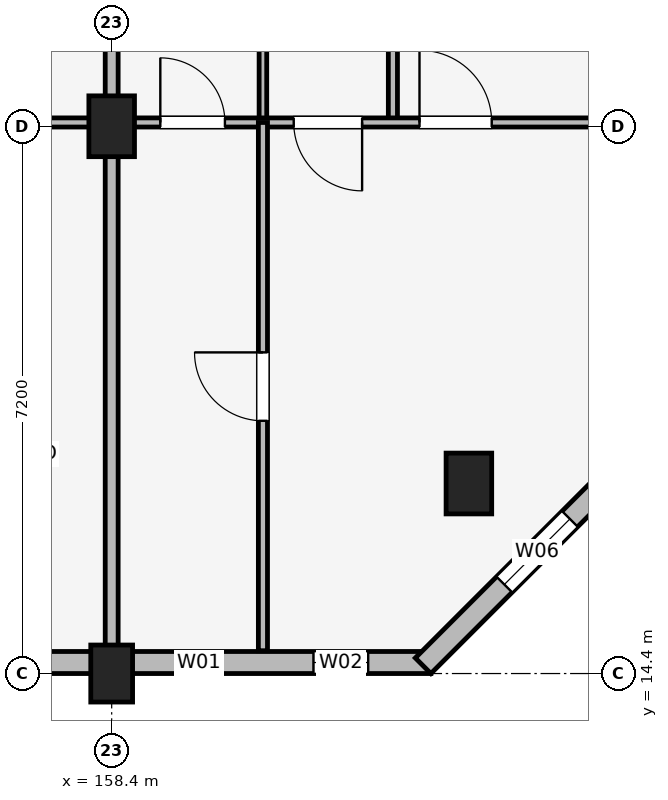
"""IFC4 building model, lengths in metres.
Left out: names, types, materials, properties, quantities, classifications, styles, units other than length and angle.
Written with IfcOpenShell. Run it as: python <this file> out.ifc"""

import sys

from ifc_helpers import new_model, si_unit, direction, frame, frame_2d, origin, origin_2d, place, context, subcontext, project, spatial, rectangle, extrude, element, fill, save


model = new_model("IFC4")
c1 = context("Model", 3, precision=1e-05, world=origin(), true_north=direction((0.0, 1.0)))
c2 = subcontext(c1, "Body", "Model", "MODEL_VIEW")
j1 = project(units=[si_unit("LENGTHUNIT", "METRE"), si_unit("PLANEANGLEUNIT", "RADIAN")], contexts=[c1])
p1 = place(None, origin())
s1 = spatial("IfcSite", under=j1, at=p1, CompositionType="ELEMENT")
p2 = place(p1, origin())
s2 = spatial("IfcBuilding", under=s1, at=p2, CompositionType="ELEMENT")
p3 = place(p2, origin())
s3 = spatial("IfcBuildingStorey", under=s2, at=p3, CompositionType="ELEMENT", Elevation=0.0)
p4 = place(p3, frame((158.4, 14.4, 0.0), z_axis=(0.0, 0.0, 1.0), x_axis=(1.0, 0.0, 0.0)))
e1 = element("IfcColumn", 1, at=p4, inside=s3, PredefinedType="COLUMN", context=c2, shape_type="SweptSolid", body=[
    extrude(rectangle(XDim=0.55, YDim=0.75, at=origin_2d()), origin(), (0.0, 0.0, 1.0), 4.5),
])
for number, where, z_axis, x_axis in (
    (2, (158.4, 21.6, 0.0), (0.0, 0.0, 1.0), (1.0, 0.0, 0.0)),
    (3, (163.1, 16.9, 0.0), (0.0, 0.0, 1.0), (1.0, 0.0, 0.0)),
):
    element("IfcColumn", number, at=place(p3, frame(where, z_axis=z_axis, x_axis=x_axis)), inside=s3, PredefinedType="COLUMN", context=c2, shape_type="SweptSolid", body=[
        extrude(rectangle(XDim=0.6, YDim=0.8, at=origin_2d()), origin(), (0.0, 0.0, 1.0), 4.5),
    ])
p5 = place(p3, frame((132.6, 14.545, 0.0), z_axis=(0.0, 0.0, 1.0), x_axis=(1.0, 0.0, 0.0)))
e4 = element("IfcWall", 4, at=p5, inside=s3, PredefinedType="SOLIDWALL", context=c2, shape_type="SweptSolid", body=[
    extrude(rectangle(XDim=30.0, YDim=0.29, at=frame_2d((15.0, 0.0))), origin(), (0.0, 0.0, 1.0), 3.38),
])
p6 = place(p5, frame((14.35, 0.0, 0.0), z_axis=(0.0, 0.0, 1.0), x_axis=(-1.0, 0.0, 0.0)))
e5 = element("IfcOpeningElement", 5, at=p6, cuts=e4, PredefinedType="OPENING", context=c2, shape_type="SweptSolid", body=[
    extrude(rectangle(XDim=1.8, YDim=2.4, at=frame_2d((0.9, 1.2))), frame((0.0, 0.155, 0.0), z_axis=(0.0, -1.0, 0.0), x_axis=(1.0, 0.0, 0.0)), (0.0, 0.0, 1.0), 0.31),
])
p7 = place(p5, frame((2.663, 0.0, 0.75)))
e6 = element("IfcOpeningElement", 6, at=p7, cuts=e4, PredefinedType="OPENING", context=c2, shape_type="SweptSolid", body=[
    extrude(rectangle(XDim=0.98, YDim=1.45, at=frame_2d((0.49, 0.725))), frame((0.0, 0.155, 0.0), z_axis=(0.0, -1.0, 0.0), x_axis=(1.0, 0.0, 0.0)), (0.0, 0.0, 1.0), 0.31),
])
p8 = place(p5, frame((4.798, 0.0, 0.75)))
e7 = element("IfcOpeningElement", 7, at=p8, cuts=e4, PredefinedType="OPENING", context=c2, shape_type="SweptSolid", body=[
    extrude(rectangle(XDim=1.1, YDim=1.5, at=frame_2d((0.55, 0.75))), frame((0.0, 0.155, 0.0), z_axis=(0.0, -1.0, 0.0), x_axis=(1.0, 0.0, 0.0)), (0.0, 0.0, 1.0), 0.31),
])
p9 = place(p5, frame((7.492, 0.0, 0.7)))
e8 = element("IfcOpeningElement", 8, at=p9, cuts=e4, PredefinedType="OPENING", context=c2, shape_type="SweptSolid", body=[
    extrude(rectangle(XDim=2.3, YDim=1.65, at=frame_2d((1.15, 0.825))), frame((0.0, 0.155, 0.0), z_axis=(0.0, -1.0, 0.0), x_axis=(1.0, 0.0, 0.0)), (0.0, 0.0, 1.0), 0.31),
])
p10 = place(p5, frame((19.077, 0.0, 0.75)))
e9 = element("IfcOpeningElement", 9, at=p10, cuts=e4, PredefinedType="OPENING", context=c2, shape_type="SweptSolid", body=[
    extrude(rectangle(XDim=1.34, YDim=1.55, at=frame_2d((0.67, 0.775))), frame((0.0, 0.155, 0.0), z_axis=(0.0, -1.0, 0.0), x_axis=(1.0, 0.0, 0.0)), (0.0, 0.0, 1.0), 0.31),
])
p11 = place(p5, frame((22.317, 0.0, 0.7)))
e10 = element("IfcOpeningElement", 10, at=p11, cuts=e4, PredefinedType="OPENING", context=c2, shape_type="SweptSolid", body=[
    extrude(rectangle(XDim=1.45, YDim=2.1, at=frame_2d((0.725, 1.05))), frame((0.0, 0.155, 0.0), z_axis=(0.0, -1.0, 0.0), x_axis=(1.0, 0.0, 0.0)), (0.0, 0.0, 1.0), 0.31),
])
p12 = place(p5, frame((26.647, 0.0, 0.75)))
e11 = element("IfcOpeningElement", 11, at=p12, cuts=e4, PredefinedType="OPENING", context=c2, shape_type="SweptSolid", body=[
    extrude(rectangle(XDim=0.6, YDim=1.25, at=frame_2d((0.3, 0.625))), frame((0.0, 0.155, 0.0), z_axis=(0.0, -1.0, 0.0), x_axis=(1.0, 0.0, 0.0)), (0.0, 0.0, 1.0), 0.31),
])
p13 = place(p5, frame((28.455, 0.0, 0.75)))
e12 = element("IfcOpeningElement", 12, at=p13, cuts=e4, PredefinedType="OPENING", context=c2, shape_type="SweptSolid", body=[
    extrude(rectangle(XDim=0.72, YDim=1.35, at=frame_2d((0.36, 0.675))), frame((0.0, 0.155, 0.0), z_axis=(0.0, -1.0, 0.0), x_axis=(1.0, 0.0, 0.0)), (0.0, 0.0, 1.0), 0.31),
])
p14 = place(p3, frame((162.498, 14.502, 0.0), z_axis=(0.0, 0.0, 1.0), x_axis=(0.707106781187, 0.707106781187, 0.0)))
e13 = element("IfcWall", 13, at=p14, inside=s3, PredefinedType="SOLIDWALL", context=c2, shape_type="SweptSolid", body=[
    extrude(rectangle(XDim=4.243, YDim=0.29, at=frame_2d((2.121, 0.0))), origin(), (0.0, 0.0, 1.0), 4.175),
])
p15 = place(p14, frame((1.511, 0.0, 0.85)))
e14 = element("IfcOpeningElement", 14, at=p15, cuts=e13, PredefinedType="OPENING", context=c2, shape_type="SweptSolid", body=[
    extrude(rectangle(XDim=1.22, YDim=1.5, at=frame_2d((0.61, 0.75))), frame((0.0, 0.155, 0.0), z_axis=(0.0, -1.0, 0.0), x_axis=(1.0, 0.0, 0.0)), (0.0, 0.0, 1.0), 0.31),
])
p16 = place(p3, frame((151.34, 21.65, 0.0), z_axis=(0.0, 0.0, 1.0), x_axis=(1.0, 0.0, 0.0)))
e15 = element("IfcWall", 15, at=p16, inside=s3, PredefinedType="PARTITIONING", context=c2, shape_type="SweptSolid", body=[
    extrude(rectangle(XDim=6.92, YDim=0.12, at=frame_2d((3.46, 0.0))), origin(), (0.0, 0.0, 1.0), 3.15),
])
p17 = place(p16, frame((1.35, 0.0, 0.0), z_axis=(0.0, 0.0, 1.0), x_axis=(-1.0, 0.0, 0.0)))
e16 = element("IfcOpeningElement", 16, at=p17, cuts=e15, PredefinedType="OPENING", context=c2, shape_type="SweptSolid", body=[
    extrude(rectangle(XDim=0.85, YDim=2.08, at=frame_2d((0.425, 1.04))), frame((0.0, 0.07, 0.0), z_axis=(0.0, -1.0, 0.0), x_axis=(1.0, 0.0, 0.0)), (0.0, 0.0, 1.0), 0.14),
])
p18 = place(p16, frame((2.375, 0.0, 0.0)))
e17 = element("IfcOpeningElement", 17, at=p18, cuts=e15, PredefinedType="OPENING", context=c2, shape_type="SweptSolid", body=[
    extrude(rectangle(XDim=0.9, YDim=2.08, at=frame_2d((0.45, 1.04))), frame((0.0, 0.07, 0.0), z_axis=(0.0, -1.0, 0.0), x_axis=(1.0, 0.0, 0.0)), (0.0, 0.0, 1.0), 0.14),
])
p19 = place(p16, frame((5.835, 0.0, 0.0), z_axis=(0.0, 0.0, 1.0), x_axis=(-1.0, 0.0, 0.0)))
e18 = element("IfcOpeningElement", 18, at=p19, cuts=e15, PredefinedType="OPENING", context=c2, shape_type="SweptSolid", body=[
    extrude(rectangle(XDim=0.95, YDim=2.08, at=frame_2d((0.475, 1.04))), frame((0.0, 0.07, 0.0), z_axis=(0.0, -1.0, 0.0), x_axis=(1.0, 0.0, 0.0)), (0.0, 0.0, 1.0), 0.14),
])
p20 = place(p3, frame((158.4, 14.7, 0.0), z_axis=(0.0, 0.0, 1.0), x_axis=(0.0, 1.0, 0.0)))
e19 = element("IfcWall", 19, at=p20, inside=s3, PredefinedType="PARTITIONING", context=c2, shape_type="SweptSolid", body=[
    extrude(rectangle(XDim=9.6, YDim=0.17, at=frame_2d((4.8, 0.0))), origin(), (0.0, 0.0, 1.0), 3.15),
])
p21 = place(p3, frame((160.39, 21.65, 0.0), z_axis=(0.0, 0.0, 1.0), x_axis=(0.0, 1.0, 0.0)))
e20 = element("IfcWall", 20, at=p21, inside=s3, PredefinedType="PARTITIONING", context=c2, shape_type="SweptSolid", body=[
    extrude(rectangle(XDim=2.65, YDim=0.1, at=frame_2d((1.325, 0.0))), origin(), (0.0, 0.0, 1.0), 3.15),
])
p22 = place(p3, frame((162.1, 21.65, 0.0), z_axis=(0.0, 0.0, 1.0), x_axis=(0.0, 1.0, 0.0)))
e21 = element("IfcWall", 21, at=p22, inside=s3, PredefinedType="PARTITIONING", context=c2, shape_type="SweptSolid", body=[
    extrude(rectangle(XDim=2.65, YDim=0.12, at=frame_2d((1.325, 0.0))), origin(), (0.0, 0.0, 1.0), 3.15),
])
p23 = place(p3, frame((158.54, 21.65, 0.0), z_axis=(0.0, 0.0, 1.0), x_axis=(1.0, 0.0, 0.0)))
e22 = element("IfcWall", 22, at=p23, inside=s3, PredefinedType="PARTITIONING", context=c2, shape_type="SweptSolid", body=[
    extrude(rectangle(XDim=6.92, YDim=0.12, at=frame_2d((3.46, 0.0))), origin(), (0.0, 0.0, 1.0), 3.15),
])
p24 = place(p23, frame((0.5, 0.0, 0.0)))
e23 = element("IfcOpeningElement", 23, at=p24, cuts=e22, PredefinedType="OPENING", context=c2, shape_type="SweptSolid", body=[
    extrude(rectangle(XDim=0.85, YDim=2.08, at=frame_2d((0.425, 1.04))), frame((0.0, 0.07, 0.0), z_axis=(0.0, -1.0, 0.0), x_axis=(1.0, 0.0, 0.0)), (0.0, 0.0, 1.0), 0.14),
])
p25 = place(p23, frame((3.155, 0.0, 0.0), z_axis=(0.0, 0.0, 1.0), x_axis=(-1.0, 0.0, 0.0)))
e24 = element("IfcOpeningElement", 24, at=p25, cuts=e22, PredefinedType="OPENING", context=c2, shape_type="SweptSolid", body=[
    extrude(rectangle(XDim=0.9, YDim=2.08, at=frame_2d((0.45, 1.04))), frame((0.0, 0.07, 0.0), z_axis=(0.0, -1.0, 0.0), x_axis=(1.0, 0.0, 0.0)), (0.0, 0.0, 1.0), 0.14),
])
p26 = place(p23, frame((3.91, 0.0, 0.0)))
e25 = element("IfcOpeningElement", 25, at=p26, cuts=e22, PredefinedType="OPENING", context=c2, shape_type="SweptSolid", body=[
    extrude(rectangle(XDim=0.95, YDim=2.08, at=frame_2d((0.475, 1.04))), frame((0.0, 0.07, 0.0), z_axis=(0.0, -1.0, 0.0), x_axis=(1.0, 0.0, 0.0)), (0.0, 0.0, 1.0), 0.14),
])
p27 = place(p3, frame((160.39, 14.7, 0.0), z_axis=(0.0, 0.0, 1.0), x_axis=(0.0, 1.0, 0.0)))
e26 = element("IfcWall", 26, at=p27, inside=s3, PredefinedType="PARTITIONING", context=c2, shape_type="SweptSolid", body=[
    extrude(rectangle(XDim=6.95, YDim=0.12, at=frame_2d((3.475, 0.0))), origin(), (0.0, 0.0, 1.0), 3.15),
])
p28 = place(p27, frame((3.025, 0.0, 0.0)))
e27 = element("IfcOpeningElement", 27, at=p28, cuts=e26, PredefinedType="OPENING", context=c2, shape_type="SweptSolid", body=[
    extrude(rectangle(XDim=0.9, YDim=2.08, at=frame_2d((0.45, 1.04))), frame((0.0, 0.07, 0.0), z_axis=(0.0, -1.0, 0.0), x_axis=(1.0, 0.0, 0.0)), (0.0, 0.0, 1.0), 0.14),
])
p29 = place(p15, origin())
e28 = element("IfcWindow", 28, at=p29, inside=s3, PartitioningType="SINGLE_PANEL", PredefinedType="WINDOW", context=c2, shape_type="SweptSolid", body=[
    extrude(rectangle(XDim=1.22, YDim=1.5, at=frame_2d((0.61, 0.75))), frame((0.0, 0.03, 0.0), z_axis=(0.0, -1.0, 0.0), x_axis=(1.0, 0.0, 0.0)), (0.0, 0.0, 1.0), 0.06),
])
fill(e14, e28)
p30 = place(p12, origin())
e29 = element("IfcWindow", 29, at=p30, inside=s3, PartitioningType="SINGLE_PANEL", PredefinedType="WINDOW", context=c2, shape_type="SweptSolid", body=[
    extrude(rectangle(XDim=0.6, YDim=1.25, at=frame_2d((0.3, 0.625))), frame((0.0, 0.03, 0.0), z_axis=(0.0, -1.0, 0.0), x_axis=(1.0, 0.0, 0.0)), (0.0, 0.0, 1.0), 0.06),
])
fill(e11, e29)
p31 = place(p13, origin())
e30 = element("IfcWindow", 30, at=p31, inside=s3, PartitioningType="SINGLE_PANEL", PredefinedType="WINDOW", context=c2, shape_type="SweptSolid", body=[
    extrude(rectangle(XDim=0.72, YDim=1.35, at=frame_2d((0.36, 0.675))), frame((0.0, 0.03, 0.0), z_axis=(0.0, -1.0, 0.0), x_axis=(1.0, 0.0, 0.0)), (0.0, 0.0, 1.0), 0.06),
])
fill(e12, e30)
p32 = place(p24, origin())
e31 = element("IfcDoor", 31, at=p32, inside=s3, OperationType="SINGLE_SWING_LEFT", PredefinedType="DOOR", context=c2, shape_type="SweptSolid", body=[
    extrude(rectangle(XDim=0.85, YDim=2.08, at=frame_2d((0.425, 1.04))), frame((0.0, 0.025, 0.0), z_axis=(0.0, -1.0, 0.0), x_axis=(1.0, 0.0, 0.0)), (0.0, 0.0, 1.0), 0.05),
])
fill(e23, e31)
p33 = place(p25, origin())
e32 = element("IfcDoor", 32, at=p33, inside=s3, OperationType="SINGLE_SWING_RIGHT", PredefinedType="DOOR", context=c2, shape_type="SweptSolid", body=[
    extrude(rectangle(XDim=0.9, YDim=2.08, at=frame_2d((0.45, 1.04))), frame((0.0, 0.025, 0.0), z_axis=(0.0, -1.0, 0.0), x_axis=(1.0, 0.0, 0.0)), (0.0, 0.0, 1.0), 0.05),
])
fill(e24, e32)
p34 = place(p26, origin())
e33 = element("IfcDoor", 33, at=p34, inside=s3, OperationType="SINGLE_SWING_LEFT", PredefinedType="DOOR", context=c2, shape_type="SweptSolid", body=[
    extrude(rectangle(XDim=0.95, YDim=2.08, at=frame_2d((0.475, 1.04))), frame((0.0, 0.025, 0.0), z_axis=(0.0, -1.0, 0.0), x_axis=(1.0, 0.0, 0.0)), (0.0, 0.0, 1.0), 0.05),
])
fill(e25, e33)
p35 = place(p28, origin())
e34 = element("IfcDoor", 34, at=p35, inside=s3, OperationType="SINGLE_SWING_RIGHT", PredefinedType="DOOR", context=c2, shape_type="SweptSolid", body=[
    extrude(rectangle(XDim=0.9, YDim=2.08, at=frame_2d((0.45, 1.04))), frame((0.0, 0.025, 0.0), z_axis=(0.0, -1.0, 0.0), x_axis=(1.0, 0.0, 0.0)), (0.0, 0.0, 1.0), 0.05),
])
fill(e27, e34)
save(model, sys.argv[1])
